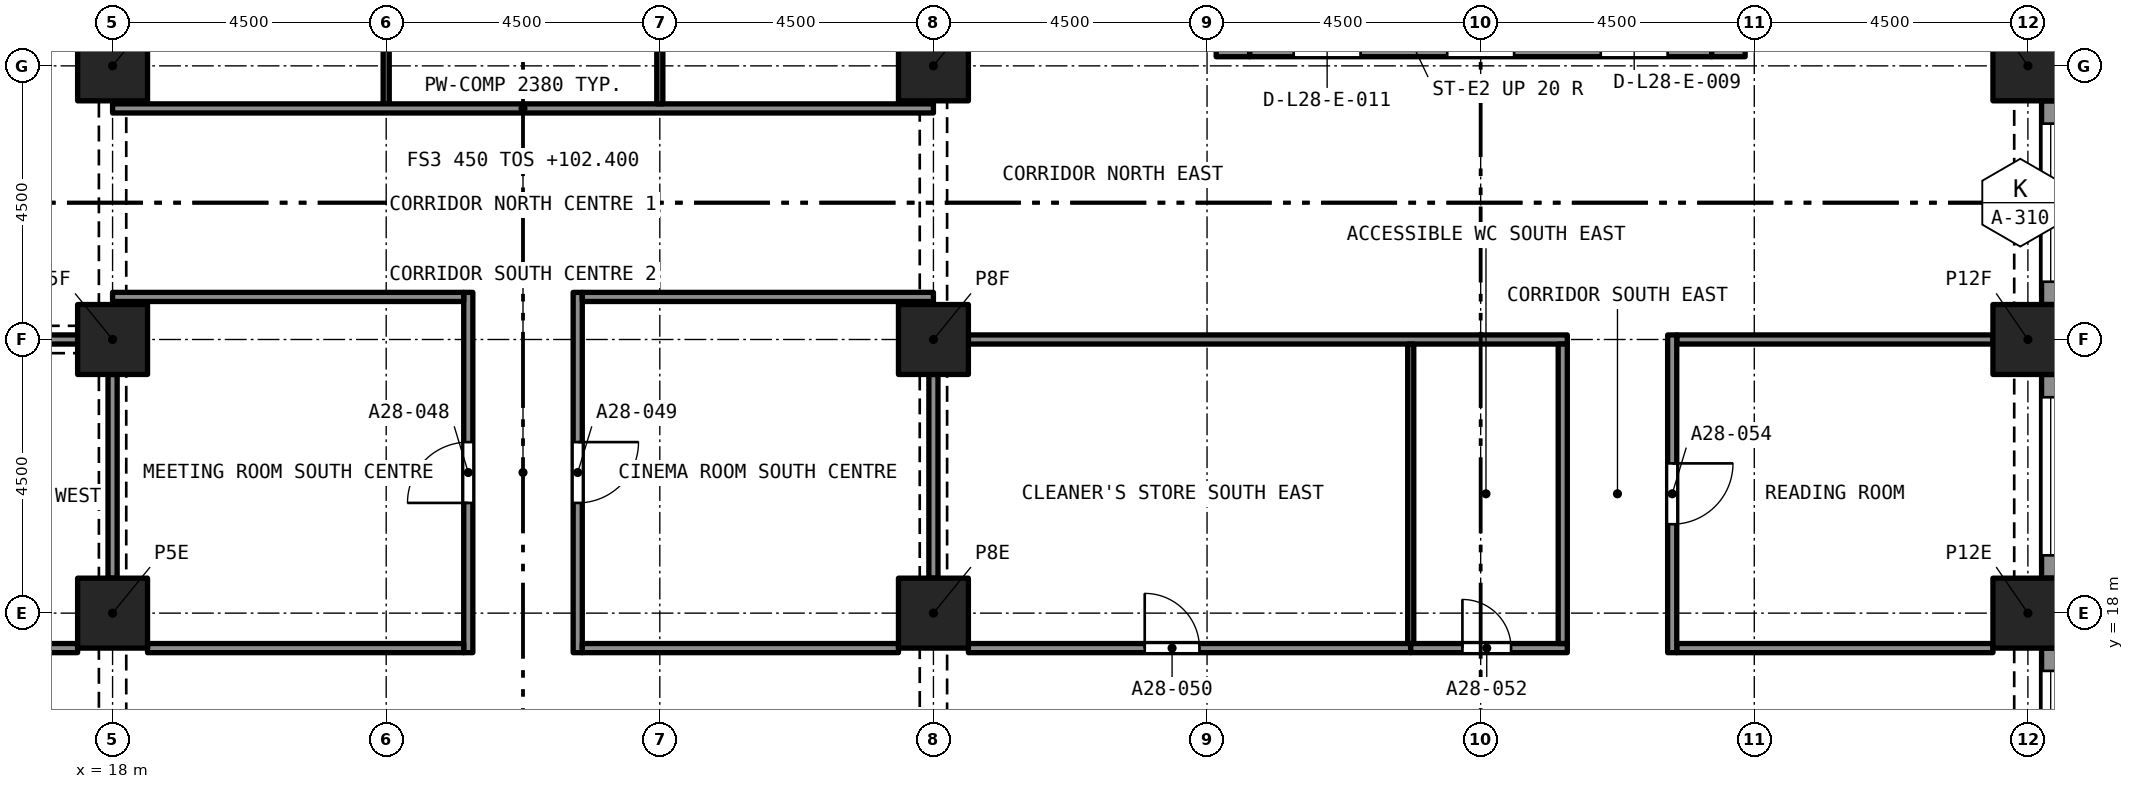
"""IFC4 building model, lengths in metres.
Left out: names, types, materials, properties, quantities, classifications, styles, units other than length and angle.
Written with IfcOpenShell. Run it as: python <this file> out.ifc"""

import sys

from ifc_helpers import new_model, si_unit, direction, frame, frame_2d, origin, origin_2d, place, context, subcontext, project, spatial, rectangle, extrude, element, fill, save


model = new_model("IFC4")
c1 = context("Model", 3, precision=1e-05, world=origin(), true_north=direction((0.0, 1.0)))
c2 = subcontext(c1, "Body", "Model", "MODEL_VIEW")
j1 = project(units=[si_unit("LENGTHUNIT", "METRE"), si_unit("PLANEANGLEUNIT", "RADIAN")], contexts=[c1])
p1 = place(None, origin())
s1 = spatial("IfcSite", under=j1, at=p1, CompositionType="ELEMENT")
p2 = place(p1, origin())
s2 = spatial("IfcBuilding", under=s1, at=p2, CompositionType="ELEMENT")
p3 = place(p2, frame((0.0, 0.0, 102.4)))
s3 = spatial("IfcBuildingStorey", under=s2, at=p3, CompositionType="ELEMENT", Elevation=102.4)
for number, where, z_axis, x_axis in (
    (1, (18.0, 18.0, 0.0), (0.0, 0.0, 1.0), (1.0, 0.0, 0.0)),
    (2, (31.5, 18.0, 0.0), (0.0, 0.0, 1.0), (1.0, 0.0, 0.0)),
    (3, (49.5, 18.0, 0.0), (0.0, 0.0, 1.0), (1.0, 0.0, 0.0)),
    (4, (18.0, 22.5, 0.0), (0.0, 0.0, 1.0), (1.0, 0.0, 0.0)),
    (5, (31.5, 22.5, 0.0), (0.0, 0.0, 1.0), (1.0, 0.0, 0.0)),
    (6, (49.5, 22.5, 0.0), (0.0, 0.0, 1.0), (1.0, 0.0, 0.0)),
    (7, (18.0, 27.0, 0.0), (0.0, 0.0, 1.0), (1.0, 0.0, 0.0)),
    (8, (31.5, 27.0, 0.0), (0.0, 0.0, 1.0), (1.0, 0.0, 0.0)),
    (9, (49.5, 27.0, 0.0), (0.0, 0.0, 1.0), (1.0, 0.0, 0.0)),
):
    element("IfcColumn", number, at=place(p3, frame(where, z_axis=z_axis, x_axis=x_axis)), inside=s3, PredefinedType="COLUMN", context=c2, shape_type="SweptSolid", body=[
        extrude(rectangle(XDim=1.15, YDim=1.15, at=origin_2d()), origin(), (0.0, 0.0, 1.0), 3.2),
    ])
p4 = place(p3, frame((36.7, 27.425, 0.0), z_axis=(0.0, 0.0, 1.0), x_axis=(1.0, 0.0, 0.0)))
e10 = element("IfcWall", 10, at=p4, inside=s3, PredefinedType="SOLIDWALL", context=c2, shape_type="SweptSolid", body=[
    extrude(rectangle(XDim=7.6, YDim=0.55, at=frame_2d((3.8, 0.0))), origin(), (0.0, 0.0, 1.0), 3.2),
])
p5 = place(p4, frame((5.775, 0.0, 0.0)))
e11 = element("IfcOpeningElement", 11, at=p5, cuts=e10, PredefinedType="OPENING", context=c2, shape_type="SweptSolid", body=[
    extrude(rectangle(XDim=1.1, YDim=2.1, at=frame_2d((0.55, 1.05))), frame((0.0, 0.285, 0.0), z_axis=(0.0, -1.0, 0.0), x_axis=(1.0, 0.0, 0.0)), (0.0, 0.0, 1.0), 0.57),
])
p6 = place(p4, frame((3.25, 0.0, 0.0)))
e12 = element("IfcOpeningElement", 12, at=p6, cuts=e10, PredefinedType="OPENING", context=c2, shape_type="SweptSolid", body=[
    extrude(rectangle(XDim=1.1, YDim=2.1, at=frame_2d((0.55, 1.05))), frame((0.0, 0.285, 0.0), z_axis=(0.0, -1.0, 0.0), x_axis=(1.0, 0.0, 0.0)), (0.0, 0.0, 1.0), 0.57),
])
p7 = place(p4, frame((0.725, 0.0, 0.0)))
e13 = element("IfcOpeningElement", 13, at=p7, cuts=e10, PredefinedType="OPENING", context=c2, shape_type="SweptSolid", body=[
    extrude(rectangle(XDim=1.1, YDim=2.1, at=frame_2d((0.55, 1.05))), frame((0.0, 0.285, 0.0), z_axis=(0.0, -1.0, 0.0), x_axis=(1.0, 0.0, 0.0)), (0.0, 0.0, 1.0), 0.57),
])
p8 = place(p3, frame((36.425, 27.15, 0.0), z_axis=(0.0, 0.0, 1.0), x_axis=(0.0, 1.0, 0.0)))
e14 = element("IfcWall", 14, at=p8, inside=s3, PredefinedType="SOLIDWALL", context=c2, shape_type="SweptSolid", body=[
    extrude(rectangle(XDim=13.2, YDim=0.55, at=frame_2d((6.6, 0.0))), origin(), (0.0, 0.0, 1.0), 3.2),
])
p9 = place(p8, frame((8.8, 0.0, 0.0)))
e15 = element("IfcOpeningElement", 15, at=p9, cuts=e14, PredefinedType="OPENING", context=c2, shape_type="SweptSolid", body=[
    extrude(rectangle(XDim=1.2, YDim=2.1, at=frame_2d((0.6, 1.05))), frame((0.0, 0.285, 0.0), z_axis=(0.0, -1.0, 0.0), x_axis=(1.0, 0.0, 0.0)), (0.0, 0.0, 1.0), 0.57),
])
p10 = place(p3, frame((44.575, 27.15, 0.0), z_axis=(0.0, 0.0, 1.0), x_axis=(0.0, 1.0, 0.0)))
e16 = element("IfcWall", 16, at=p10, inside=s3, PredefinedType="SOLIDWALL", context=c2, shape_type="SweptSolid", body=[
    extrude(rectangle(XDim=13.2, YDim=0.55, at=frame_2d((6.6, 0.0))), origin(), (0.0, 0.0, 1.0), 3.2),
])
p11 = place(p10, frame((8.8, 0.0, 0.0)))
e17 = element("IfcOpeningElement", 17, at=p11, cuts=e16, PredefinedType="OPENING", context=c2, shape_type="SweptSolid", body=[
    extrude(rectangle(XDim=1.2, YDim=2.1, at=frame_2d((0.6, 1.05))), frame((0.0, 0.285, 0.0), z_axis=(0.0, -1.0, 0.0), x_axis=(1.0, 0.0, 0.0)), (0.0, 0.0, 1.0), 0.57),
])
p12 = place(p3, frame((49.875, 17.425, 0.0), z_axis=(0.0, 0.0, 1.0), x_axis=(0.0, -1.0, 0.0)))
e18 = element("IfcWall", 18, at=p12, inside=s3, PredefinedType="SOLIDWALL", context=c2, shape_type="SweptSolid", body=[
    extrude(rectangle(XDim=3.35, YDim=0.3, at=frame_2d((1.675, 0.0))), origin(), (0.0, 0.0, 1.0), 3.2),
])
p13 = place(p12, frame((0.375, 0.0, 0.45)))
e19 = element("IfcOpeningElement", 19, at=p13, cuts=e18, PredefinedType="OPENING", context=c2, shape_type="SweptSolid", body=[
    extrude(rectangle(XDim=2.6, YDim=1.95, at=frame_2d((1.3, 0.975))), frame((0.0, 0.16, 0.0), z_axis=(0.0, -1.0, 0.0), x_axis=(1.0, 0.0, 0.0)), (0.0, 0.0, 1.0), 0.32),
])
p14 = place(p3, frame((49.875, 21.925, 0.0), z_axis=(0.0, 0.0, 1.0), x_axis=(0.0, -1.0, 0.0)))
e20 = element("IfcWall", 20, at=p14, inside=s3, PredefinedType="SOLIDWALL", context=c2, shape_type="SweptSolid", body=[
    extrude(rectangle(XDim=3.35, YDim=0.3, at=frame_2d((1.675, 0.0))), origin(), (0.0, 0.0, 1.0), 3.2),
])
p15 = place(p14, frame((0.375, 0.0, 0.45)))
e21 = element("IfcOpeningElement", 21, at=p15, cuts=e20, PredefinedType="OPENING", context=c2, shape_type="SweptSolid", body=[
    extrude(rectangle(XDim=2.6, YDim=1.95, at=frame_2d((1.3, 0.975))), frame((0.0, 0.16, 0.0), z_axis=(0.0, -1.0, 0.0), x_axis=(1.0, 0.0, 0.0)), (0.0, 0.0, 1.0), 0.32),
])
p16 = place(p3, frame((49.875, 26.425, 0.0), z_axis=(0.0, 0.0, 1.0), x_axis=(0.0, -1.0, 0.0)))
e22 = element("IfcWall", 22, at=p16, inside=s3, PredefinedType="SOLIDWALL", context=c2, shape_type="SweptSolid", body=[
    extrude(rectangle(XDim=3.35, YDim=0.3, at=frame_2d((1.675, 0.0))), origin(), (0.0, 0.0, 1.0), 3.2),
])
p17 = place(p16, frame((0.375, 0.0, 0.45)))
e23 = element("IfcOpeningElement", 23, at=p17, cuts=e22, PredefinedType="OPENING", context=c2, shape_type="SweptSolid", body=[
    extrude(rectangle(XDim=2.6, YDim=1.95, at=frame_2d((1.3, 0.975))), frame((0.0, 0.16, 0.0), z_axis=(0.0, -1.0, 0.0), x_axis=(1.0, 0.0, 0.0)), (0.0, 0.0, 1.0), 0.32),
])
p18 = place(p3, frame((23.85, 17.35, 0.0), z_axis=(0.0, 0.0, 1.0), x_axis=(0.0, 1.0, 0.0)))
e24 = element("IfcWall", 24, at=p18, inside=s3, PredefinedType="PARTITIONING", context=c2, shape_type="SweptSolid", body=[
    extrude(rectangle(XDim=5.925, YDim=0.15, at=frame_2d((2.962, 0.0))), origin(), (0.0, 0.0, 1.0), 2.75),
])
p19 = place(p18, frame((2.462, 0.0, 0.0)))
e25 = element("IfcOpeningElement", 25, at=p19, cuts=e24, PredefinedType="OPENING", context=c2, shape_type="SweptSolid", body=[
    extrude(rectangle(XDim=1.0, YDim=2.1, at=frame_2d((0.5, 1.05))), frame((0.0, 0.085, 0.0), z_axis=(0.0, -1.0, 0.0), x_axis=(1.0, 0.0, 0.0)), (0.0, 0.0, 1.0), 0.17),
])
p20 = place(p3, frame((25.65, 23.275, 0.0), z_axis=(0.0, 0.0, 1.0), x_axis=(0.0, -1.0, 0.0)))
e26 = element("IfcWall", 26, at=p20, inside=s3, PredefinedType="PARTITIONING", context=c2, shape_type="SweptSolid", body=[
    extrude(rectangle(XDim=5.925, YDim=0.15, at=frame_2d((2.962, 0.0))), origin(), (0.0, 0.0, 1.0), 2.75),
])
p21 = place(p20, frame((2.462, 0.0, 0.0)))
e27 = element("IfcOpeningElement", 27, at=p21, cuts=e26, PredefinedType="OPENING", context=c2, shape_type="SweptSolid", body=[
    extrude(rectangle(XDim=1.0, YDim=2.1, at=frame_2d((0.5, 1.05))), frame((0.0, 0.085, 0.0), z_axis=(0.0, -1.0, 0.0), x_axis=(1.0, 0.0, 0.0)), (0.0, 0.0, 1.0), 0.17),
])
for number, where, z_axis, x_axis in (
    (28, (18.575, 17.425, 0.0), (0.0, 0.0, 1.0), (1.0, 0.0, 0.0)),
    (29, (25.725, 17.425, 0.0), (0.0, 0.0, 1.0), (1.0, 0.0, 0.0)),
):
    element("IfcWall", number, at=place(p3, frame(where, z_axis=z_axis, x_axis=x_axis)), inside=s3, PredefinedType="PARTITIONING", context=c2, shape_type="SweptSolid", body=[
        extrude(rectangle(XDim=5.2, YDim=0.15, at=frame_2d((2.6, 0.0))), origin(), (0.0, 0.0, 1.0), 2.75),
    ])
p22 = place(p3, frame((32.075, 17.425, 0.0), z_axis=(0.0, 0.0, 1.0), x_axis=(1.0, 0.0, 0.0)))
e30 = element("IfcWall", 30, at=p22, inside=s3, PredefinedType="PARTITIONING", context=c2, shape_type="SweptSolid", body=[
    extrude(rectangle(XDim=7.275, YDim=0.15, at=frame_2d((3.638, 0.0))), origin(), (0.0, 0.0, 1.0), 2.9),
])
p23 = place(p22, frame((2.9, 0.0, 0.0)))
e31 = element("IfcOpeningElement", 31, at=p23, cuts=e30, PredefinedType="OPENING", context=c2, shape_type="SweptSolid", body=[
    extrude(rectangle(XDim=0.9, YDim=2.1, at=frame_2d((0.45, 1.05))), frame((0.0, 0.085, 0.0), z_axis=(0.0, -1.0, 0.0), x_axis=(1.0, 0.0, 0.0)), (0.0, 0.0, 1.0), 0.17),
])
p24 = place(p3, frame((10.15, 17.425, 0.0), z_axis=(0.0, 0.0, 1.0), x_axis=(1.0, 0.0, 0.0)))
e32 = element("IfcWall", 32, at=p24, inside=s3, PredefinedType="PARTITIONING", context=c2, shape_type="SweptSolid", body=[
    extrude(rectangle(XDim=7.275, YDim=0.15, at=frame_2d((3.638, 0.0))), origin(), (0.0, 0.0, 1.0), 2.9),
])
p25 = place(p24, frame((3.475, 0.0, 0.0)))
e33 = element("IfcOpeningElement", 33, at=p25, cuts=e32, PredefinedType="OPENING", context=c2, shape_type="SweptSolid", body=[
    extrude(rectangle(XDim=0.9, YDim=2.1, at=frame_2d((0.45, 1.05))), frame((0.0, 0.085, 0.0), z_axis=(0.0, -1.0, 0.0), x_axis=(1.0, 0.0, 0.0)), (0.0, 0.0, 1.0), 0.17),
])
p26 = place(p3, frame((39.35, 17.425, 0.0), z_axis=(0.0, 0.0, 1.0), x_axis=(1.0, 0.0, 0.0)))
e34 = element("IfcWall", 34, at=p26, inside=s3, PredefinedType="PARTITIONING", context=c2, shape_type="SweptSolid", body=[
    extrude(rectangle(XDim=2.575, YDim=0.15, at=frame_2d((1.288, 0.0))), origin(), (0.0, 0.0, 1.0), 2.9),
])
p27 = place(p26, frame((0.85, 0.0, 0.0)))
e35 = element("IfcOpeningElement", 35, at=p27, cuts=e34, PredefinedType="OPENING", context=c2, shape_type="SweptSolid", body=[
    extrude(rectangle(XDim=0.8, YDim=2.1, at=frame_2d((0.4, 1.05))), frame((0.0, 0.085, 0.0), z_axis=(0.0, -1.0, 0.0), x_axis=(1.0, 0.0, 0.0)), (0.0, 0.0, 1.0), 0.17),
])
p28 = place(p3, frame((43.725, 17.425, 0.0), z_axis=(0.0, 0.0, 1.0), x_axis=(1.0, 0.0, 0.0)))
e36 = element("IfcWall", 36, at=p28, inside=s3, PredefinedType="PARTITIONING", context=c2, shape_type="SweptSolid", body=[
    extrude(rectangle(XDim=5.2, YDim=0.15, at=frame_2d((2.6, 0.0))), origin(), (0.0, 0.0, 1.0), 2.9),
])
p29 = place(p3, frame((22.5, 26.375, 0.0), z_axis=(0.0, 0.0, 1.0), x_axis=(0.0, 1.0, 0.0)))
e37 = element("IfcWall", 37, at=p29, inside=s3, PredefinedType="PARTITIONING", context=c2, shape_type="SweptSolid", body=[
    extrude(rectangle(XDim=10.125, YDim=0.1, at=frame_2d((5.062, 0.0))), origin(), (0.0, 0.0, 1.0), 2.75),
])
p30 = place(p3, frame((18.0, 26.3, 0.0), z_axis=(0.0, 0.0, 1.0), x_axis=(1.0, 0.0, 0.0)))
e38 = element("IfcWall", 38, at=p30, inside=s3, PredefinedType="PARTITIONING", context=c2, shape_type="SweptSolid", body=[
    extrude(rectangle(XDim=13.5, YDim=0.15, at=frame_2d((6.75, 0.0))), origin(), (0.0, 0.0, 1.0), 2.38),
])
p31 = place(p3, frame((27.0, 26.375, 0.0), z_axis=(0.0, 0.0, 1.0), x_axis=(0.0, 1.0, 0.0)))
e39 = element("IfcWall", 39, at=p31, inside=s3, PredefinedType="PARTITIONING", context=c2, shape_type="SweptSolid", body=[
    extrude(rectangle(XDim=10.125, YDim=0.1, at=frame_2d((5.062, 0.0))), origin(), (0.0, 0.0, 1.0), 2.75),
])
p32 = place(p3, frame((18.0, 23.2, 0.0), z_axis=(0.0, 0.0, 1.0), x_axis=(1.0, 0.0, 0.0)))
e40 = element("IfcWall", 40, at=p32, inside=s3, PredefinedType="PARTITIONING", context=c2, shape_type="SweptSolid", body=[
    extrude(rectangle(XDim=5.775, YDim=0.15, at=frame_2d((2.887, 0.0))), origin(), (0.0, 0.0, 1.0), 2.75),
])
p33 = place(p3, frame((18.0, 18.575, 0.0), z_axis=(0.0, 0.0, 1.0), x_axis=(0.0, 1.0, 0.0)))
e41 = element("IfcWall", 41, at=p33, inside=s3, PredefinedType="PARTITIONING", context=c2, shape_type="SweptSolid", body=[
    extrude(rectangle(XDim=3.35, YDim=0.15, at=frame_2d((1.675, 0.0))), origin(), (0.0, 0.0, 1.0), 2.38),
])
p34 = place(p3, frame((25.725, 23.2, 0.0), z_axis=(0.0, 0.0, 1.0), x_axis=(1.0, 0.0, 0.0)))
e42 = element("IfcWall", 42, at=p34, inside=s3, PredefinedType="PARTITIONING", context=c2, shape_type="SweptSolid", body=[
    extrude(rectangle(XDim=5.775, YDim=0.15, at=frame_2d((2.887, 0.0))), origin(), (0.0, 0.0, 1.0), 2.75),
])
p35 = place(p3, frame((31.5, 18.575, 0.0), z_axis=(0.0, 0.0, 1.0), x_axis=(0.0, 1.0, 0.0)))
e43 = element("IfcWall", 43, at=p35, inside=s3, PredefinedType="PARTITIONING", context=c2, shape_type="SweptSolid", body=[
    extrude(rectangle(XDim=3.35, YDim=0.15, at=frame_2d((1.675, 0.0))), origin(), (0.0, 0.0, 1.0), 2.38),
])
p36 = place(p3, frame((32.075, 22.5, 0.0), z_axis=(0.0, 0.0, 1.0), x_axis=(1.0, 0.0, 0.0)))
e44 = element("IfcWall", 44, at=p36, inside=s3, PredefinedType="PARTITIONING", context=c2, shape_type="SweptSolid", body=[
    extrude(rectangle(XDim=9.85, YDim=0.15, at=frame_2d((4.925, 0.0))), origin(), (0.0, 0.0, 1.0), 2.9),
])
p37 = place(p3, frame((43.725, 22.5, 0.0), z_axis=(0.0, 0.0, 1.0), x_axis=(1.0, 0.0, 0.0)))
e45 = element("IfcWall", 45, at=p37, inside=s3, PredefinedType="PARTITIONING", context=c2, shape_type="SweptSolid", body=[
    extrude(rectangle(XDim=5.2, YDim=0.15, at=frame_2d((2.6, 0.0))), origin(), (0.0, 0.0, 1.0), 2.9),
])
p38 = place(p3, frame((14.075, 22.5, 0.0), z_axis=(0.0, 0.0, 1.0), x_axis=(1.0, 0.0, 0.0)))
e46 = element("IfcWall", 46, at=p38, inside=s3, PredefinedType="PARTITIONING", context=c2, shape_type="SweptSolid", body=[
    extrude(rectangle(XDim=3.35, YDim=0.15, at=frame_2d((1.675, 0.0))), origin(), (0.0, 0.0, 1.0), 2.38),
])
p39 = place(p3, frame((41.85, 17.5, 0.0), z_axis=(0.0, 0.0, 1.0), x_axis=(0.0, 1.0, 0.0)))
e47 = element("IfcWall", 47, at=p39, inside=s3, PredefinedType="PARTITIONING", context=c2, shape_type="SweptSolid", body=[
    extrude(rectangle(XDim=4.925, YDim=0.15, at=frame_2d((2.462, 0.0))), origin(), (0.0, 0.0, 1.0), 2.9),
])
p40 = place(p3, frame((43.65, 22.575, 0.0), z_axis=(0.0, 0.0, 1.0), x_axis=(0.0, -1.0, 0.0)))
e48 = element("IfcWall", 48, at=p40, inside=s3, PredefinedType="PARTITIONING", context=c2, shape_type="SweptSolid", body=[
    extrude(rectangle(XDim=5.225, YDim=0.15, at=frame_2d((2.612, 0.0))), origin(), (0.0, 0.0, 1.0), 2.9),
])
p41 = place(p40, frame((2.113, 0.0, 0.0)))
e49 = element("IfcOpeningElement", 49, at=p41, cuts=e48, PredefinedType="OPENING", context=c2, shape_type="SweptSolid", body=[
    extrude(rectangle(XDim=1.0, YDim=2.1, at=frame_2d((0.5, 1.05))), frame((0.0, 0.085, 0.0), z_axis=(0.0, -1.0, 0.0), x_axis=(1.0, 0.0, 0.0)), (0.0, 0.0, 1.0), 0.17),
])
p42 = place(p3, frame((39.35, 17.5, 0.0), z_axis=(0.0, 0.0, 1.0), x_axis=(0.0, 1.0, 0.0)))
e50 = element("IfcWall", 50, at=p42, inside=s3, PredefinedType="PARTITIONING", context=c2, shape_type="SweptSolid", body=[
    extrude(rectangle(XDim=4.925, YDim=0.1, at=frame_2d((2.462, 0.0))), origin(), (0.0, 0.0, 1.0), 2.9),
])
p43 = place(p13, origin())
e51 = element("IfcWindow", 51, at=p43, inside=s3, PartitioningType="SINGLE_PANEL", PredefinedType="WINDOW", context=c2, shape_type="SweptSolid", body=[
    extrude(rectangle(XDim=2.6, YDim=1.95, at=frame_2d((1.3, 0.975))), frame((0.0, 0.03, 0.0), z_axis=(0.0, -1.0, 0.0), x_axis=(1.0, 0.0, 0.0)), (0.0, 0.0, 1.0), 0.06),
])
fill(e19, e51)
p44 = place(p15, origin())
e52 = element("IfcWindow", 52, at=p44, inside=s3, PartitioningType="SINGLE_PANEL", PredefinedType="WINDOW", context=c2, shape_type="SweptSolid", body=[
    extrude(rectangle(XDim=2.6, YDim=1.95, at=frame_2d((1.3, 0.975))), frame((0.0, 0.03, 0.0), z_axis=(0.0, -1.0, 0.0), x_axis=(1.0, 0.0, 0.0)), (0.0, 0.0, 1.0), 0.06),
])
fill(e21, e52)
p45 = place(p17, origin())
e53 = element("IfcWindow", 53, at=p45, inside=s3, PartitioningType="SINGLE_PANEL", PredefinedType="WINDOW", context=c2, shape_type="SweptSolid", body=[
    extrude(rectangle(XDim=2.6, YDim=1.95, at=frame_2d((1.3, 0.975))), frame((0.0, 0.03, 0.0), z_axis=(0.0, -1.0, 0.0), x_axis=(1.0, 0.0, 0.0)), (0.0, 0.0, 1.0), 0.06),
])
fill(e23, e53)
p46 = place(p19, origin())
e54 = element("IfcDoor", 54, at=p46, inside=s3, OperationType="SINGLE_SWING_RIGHT", PredefinedType="DOOR", context=c2, shape_type="SweptSolid", body=[
    extrude(rectangle(XDim=1.0, YDim=2.1, at=frame_2d((0.5, 1.05))), frame((0.0, 0.025, 0.0), z_axis=(0.0, -1.0, 0.0), x_axis=(1.0, 0.0, 0.0)), (0.0, 0.0, 1.0), 0.05),
])
fill(e25, e54)
p47 = place(p21, origin())
e55 = element("IfcDoor", 55, at=p47, inside=s3, OperationType="SINGLE_SWING_RIGHT", PredefinedType="DOOR", context=c2, shape_type="SweptSolid", body=[
    extrude(rectangle(XDim=1.0, YDim=2.1, at=frame_2d((0.5, 1.05))), frame((0.0, 0.025, 0.0), z_axis=(0.0, -1.0, 0.0), x_axis=(1.0, 0.0, 0.0)), (0.0, 0.0, 1.0), 0.05),
])
fill(e27, e55)
p48 = place(p23, origin())
e56 = element("IfcDoor", 56, at=p48, inside=s3, OperationType="SINGLE_SWING_LEFT", PredefinedType="DOOR", context=c2, shape_type="SweptSolid", body=[
    extrude(rectangle(XDim=0.9, YDim=2.1, at=frame_2d((0.45, 1.05))), frame((0.0, 0.025, 0.0), z_axis=(0.0, -1.0, 0.0), x_axis=(1.0, 0.0, 0.0)), (0.0, 0.0, 1.0), 0.05),
])
fill(e31, e56)
p49 = place(p27, origin())
e57 = element("IfcDoor", 57, at=p49, inside=s3, OperationType="SINGLE_SWING_LEFT", PredefinedType="DOOR", context=c2, shape_type="SweptSolid", body=[
    extrude(rectangle(XDim=0.8, YDim=2.1, at=frame_2d((0.4, 1.05))), frame((0.0, 0.025, 0.0), z_axis=(0.0, -1.0, 0.0), x_axis=(1.0, 0.0, 0.0)), (0.0, 0.0, 1.0), 0.05),
])
fill(e35, e57)
p50 = place(p41, origin())
e58 = element("IfcDoor", 58, at=p50, inside=s3, OperationType="SINGLE_SWING_RIGHT", PredefinedType="DOOR", context=c2, shape_type="SweptSolid", body=[
    extrude(rectangle(XDim=1.0, YDim=2.1, at=frame_2d((0.5, 1.05))), frame((0.0, 0.025, 0.0), z_axis=(0.0, -1.0, 0.0), x_axis=(1.0, 0.0, 0.0)), (0.0, 0.0, 1.0), 0.05),
])
fill(e49, e58)
save(model, sys.argv[1])
